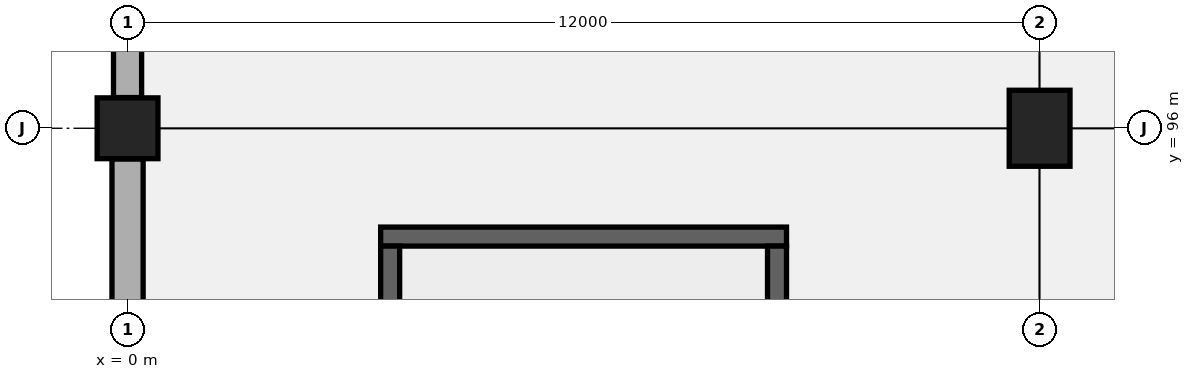
"""IFC4 building model, lengths in metres.
Left out: names, types, materials, properties, quantities, classifications, styles, units other than length and angle.
Written with IfcOpenShell. Run it as: python <this file> out.ifc"""

import sys

from ifc_helpers import new_model, si_unit, direction, frame, frame_2d, origin, origin_2d, place, context, subcontext, project, spatial, rectangle, extrude, element, save


model = new_model("IFC4")
c1 = context("Model", 3, precision=1e-05, world=origin(), true_north=direction((0.0, 1.0)))
c2 = subcontext(c1, "Body", "Model", "MODEL_VIEW")
j1 = project(units=[si_unit("LENGTHUNIT", "METRE"), si_unit("PLANEANGLEUNIT", "RADIAN")], contexts=[c1])
p1 = place(None, origin())
s1 = spatial("IfcSite", under=j1, at=p1, CompositionType="ELEMENT")
p2 = place(p1, origin())
s2 = spatial("IfcBuilding", under=s1, at=p2, CompositionType="ELEMENT")
p3 = place(p2, frame((0.0, 0.0, 10.2)))
s3 = spatial("IfcBuildingStorey", under=s2, at=p3, CompositionType="ELEMENT", Elevation=10.2)
p4 = place(p3, frame((0.0, 96.0, 0.0), z_axis=(0.0, 0.0, 1.0), x_axis=(1.0, 0.0, 0.0)))
e1 = element("IfcColumn", 1, at=p4, inside=s3, PredefinedType="COLUMN", context=c2, shape_type="SweptSolid", body=[
    extrude(rectangle(XDim=0.8, YDim=0.8, at=origin_2d()), origin(), (0.0, 0.0, 1.0), 5.1),
])
p5 = place(p3, frame((12.0, 96.0, 0.0), z_axis=(0.0, 0.0, 1.0), x_axis=(1.0, 0.0, 0.0)))
e2 = element("IfcColumn", 2, at=p5, inside=s3, PredefinedType="COLUMN", context=c2, shape_type="SweptSolid", body=[
    extrude(rectangle(XDim=0.8, YDim=1.0, at=origin_2d()), origin(), (0.0, 0.0, 1.0), 5.1),
])
p6 = place(p3, frame((0.0, 84.454, 0.0), z_axis=(0.0, 0.0, 1.0), x_axis=(0.0, 1.0, 0.0)))
e3 = element("IfcWall", 3, at=p6, inside=s3, PredefinedType="SOLIDWALL", context=c2, shape_type="SweptSolid", body=[
    extrude(rectangle(XDim=11.142, YDim=0.41, at=frame_2d((5.571, 0.0))), origin(), (0.0, 0.0, 1.0), 4.12),
])
p7 = place(p6, frame((2.75, 0.0, 0.95)))
e4 = element("IfcOpeningElement", 4, at=p7, cuts=e3, PredefinedType="OPENING", context=c2, shape_type="SweptSolid", body=[
    extrude(rectangle(XDim=3.3, YDim=2.25, at=frame_2d((1.65, 1.125))), frame((0.0, 0.215, 0.0), z_axis=(0.0, -1.0, 0.0), x_axis=(1.0, 0.0, 0.0)), (0.0, 0.0, 1.0), 0.43),
])
p8 = place(p3, frame((0.0, 96.404, 0.0), z_axis=(0.0, 0.0, 1.0), x_axis=(0.0, 1.0, 0.0)))
e5 = element("IfcWall", 5, at=p8, inside=s3, PredefinedType="SOLIDWALL", context=c2, shape_type="SweptSolid", body=[
    extrude(rectangle(XDim=0.65, YDim=0.37, at=frame_2d((0.325, 0.0))), origin(), (0.0, 0.0, 1.0), 4.232),
])
p9 = place(p3, frame((3.33, 94.575, 0.0), z_axis=(0.0, 0.0, 1.0), x_axis=(1.0, 0.0, 0.0)))
e6 = element("IfcWall", 6, at=p9, inside=s3, PredefinedType="SHEAR", context=c2, shape_type="SweptSolid", body=[
    extrude(rectangle(XDim=5.34, YDim=0.25, at=frame_2d((2.67, 0.0))), origin(), (0.0, 0.0, 1.0), 4.82),
])
for number, where, z_axis, x_axis in (
    (7, (3.455, 85.55, 0.0), (0.0, 0.0, 1.0), (0.0, 1.0, 0.0)),
    (8, (8.545, 85.55, 0.0), (0.0, 0.0, 1.0), (0.0, 1.0, 0.0)),
):
    element("IfcWall", number, at=place(p3, frame(where, z_axis=z_axis, x_axis=x_axis)), inside=s3, PredefinedType="SHEAR", context=c2, shape_type="SweptSolid", body=[
        extrude(rectangle(XDim=8.9, YDim=0.25, at=frame_2d((4.45, 0.0))), origin(), (0.0, 0.0, 1.0), 4.82),
    ])
save(model, sys.argv[1])
